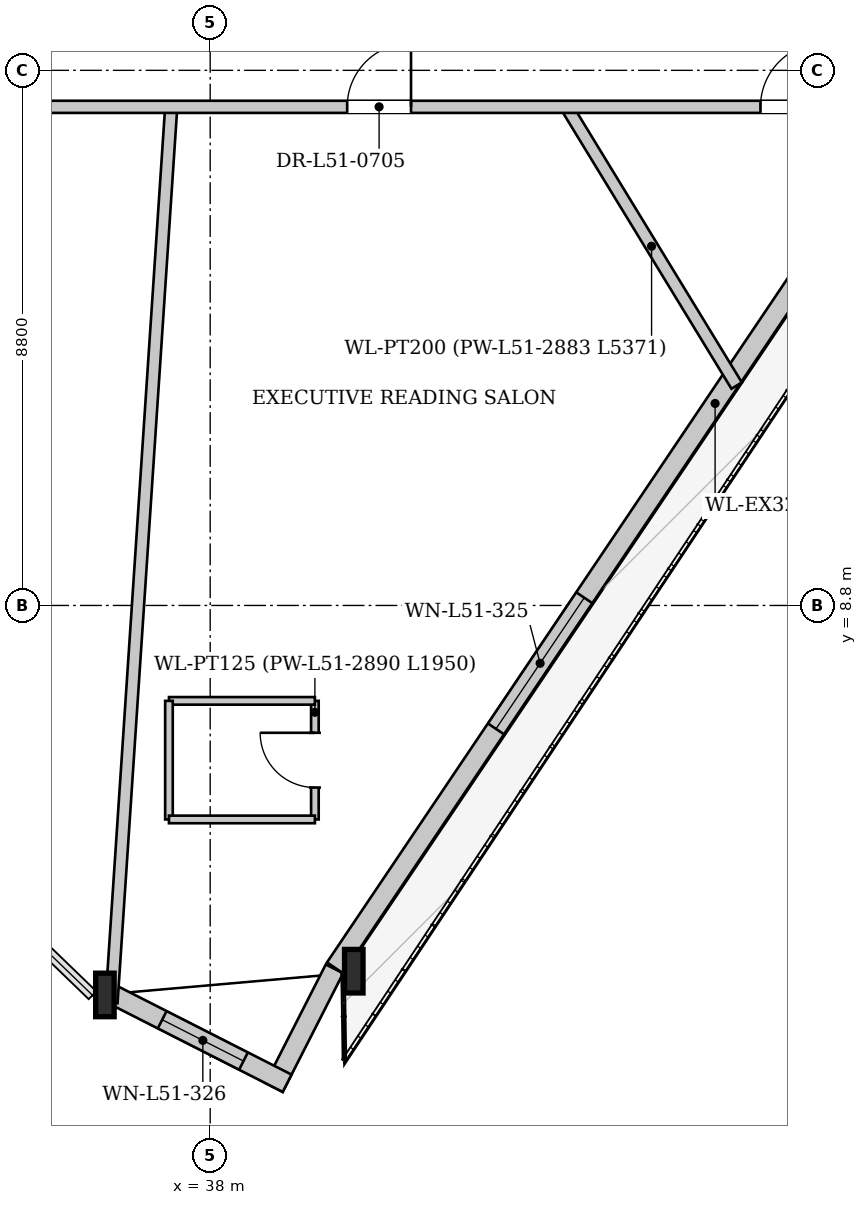
"""IFC4 building model, lengths in metres.
Left out: names, types, materials, properties, quantities, classifications, styles, units other than length and angle.
Written with IfcOpenShell. Run it as: python <this file> out.ifc"""

import sys

from ifc_helpers import new_model, si_unit, direction, frame, frame_2d, origin, origin_2d, place, context, subcontext, project, spatial, rectangle, i_section, extrude, source, transform, mapped, element, fill, save


model = new_model("IFC4")
c1 = context("Model", 3, precision=1e-05, world=origin(), true_north=direction((0.0, 1.0)))
c2 = subcontext(c1, "Body", "Model", "MODEL_VIEW")
j1 = project(units=[si_unit("LENGTHUNIT", "METRE"), si_unit("PLANEANGLEUNIT", "RADIAN")], contexts=[c1])
p1 = place(None, origin())
s1 = spatial("IfcSite", under=j1, at=p1, CompositionType="ELEMENT")
p2 = place(p1, origin())
s2 = spatial("IfcBuilding", under=s1, at=p2, CompositionType="ELEMENT")
p3 = place(p2, frame((0.0, 0.0, 192.75)))
s3 = spatial("IfcBuildingStorey", under=s2, at=p3, CompositionType="ELEMENT", Elevation=192.75)
m1 = source(origin(), c2, "Body", "SweptSolid", [
    extrude(i_section(OverallWidth=0.304, OverallDepth=0.716, WebThickness=0.021, FlangeThickness=0.04, at=origin_2d()), origin(), (0.0, 0.0, 1.0), 3.409),
])
p4 = place(p3, frame((36.064, 2.39, 0.0), z_axis=(0.119582447406, 0.002649431469, 0.992820738495), x_axis=(-0.022150252792, 0.999754653053, 0.0)))
e1 = element("IfcColumn", 1, at=p4, inside=s3, PredefinedType="COLUMN", context=c2, shape_type="MappedRepresentation", body=[
    mapped(m1, transform((0.0, 0.0, 0.0), x_axis=(1.0, 0.0, 0.0), y_axis=(0.0, 1.0, 0.0), z_axis=(0.0, 0.0, 1.0), scale=1.0)),
])
m2 = source(origin(), c2, "Body", "SweptSolid", [
    extrude(i_section(OverallWidth=0.304, OverallDepth=0.716, WebThickness=0.021, FlangeThickness=0.04, at=origin_2d()), origin(), (0.0, 0.0, 1.0), 3.404),
])
p5 = place(p3, frame((40.186, 2.751, 0.0), z_axis=(0.10306941783, 0.020011390101, 0.994472844966), x_axis=(-0.190595380808, 0.981668681794, 0.0)))
e2 = element("IfcColumn", 2, at=p5, inside=s3, PredefinedType="COLUMN", context=c2, shape_type="MappedRepresentation", body=[
    mapped(m2, transform((0.0, 0.0, 0.0), x_axis=(1.0, 0.0, 0.0), y_axis=(0.0, 1.0, 0.0), z_axis=(0.0, 0.0, 1.0), scale=1.0)),
])
p6 = place(p3, frame((53.026, 22.104, 0.0), z_axis=(0.0, 0.0, 1.0), x_axis=(-0.558570859801, -0.829456806941, 0.0)))
e3 = element("IfcWall", 3, at=p6, inside=s3, PredefinedType="SOLIDWALL", context=c2, shape_type="SweptSolid", body=[
    extrude(rectangle(XDim=23.224, YDim=0.32, at=frame_2d((11.612, 0.0))), origin(), (0.0, 0.0, 1.0), 2.722),
])
p7 = place(p6, frame((6.682, 0.0, 0.0)))
e4 = element("IfcOpeningElement", 4, at=p7, cuts=e3, PredefinedType="OPENING", context=c2, shape_type="SweptSolid", body=[
    extrude(rectangle(XDim=1.5, YDim=2.3, at=frame_2d((0.75, 1.15))), frame((0.0, 0.17, 0.0), z_axis=(0.0, -1.0, 0.0), x_axis=(1.0, 0.0, 0.0)), (0.0, 0.0, 1.0), 0.34),
])
p8 = place(p6, frame((15.886, 0.0, 0.252)))
e5 = element("IfcOpeningElement", 5, at=p8, cuts=e3, PredefinedType="OPENING", context=c2, shape_type="SweptSolid", body=[
    extrude(rectangle(XDim=2.6, YDim=2.35, at=frame_2d((1.3, 1.175))), frame((0.0, 0.17, 0.0), z_axis=(0.0, -1.0, 0.0), x_axis=(1.0, 0.0, 0.0)), (0.0, 0.0, 1.0), 0.34),
])
p9 = place(p3, frame((40.044, 2.824, 0.0), z_axis=(0.0, 0.0, 1.0), x_axis=(-0.45371363181, -0.891147541269, 0.0)))
e6 = element("IfcWall", 6, at=p9, inside=s3, PredefinedType="SOLIDWALL", context=c2, shape_type="SweptSolid", body=[
    extrude(rectangle(XDim=2.189, YDim=0.32, at=frame_2d((1.095, 0.0))), origin(), (0.0, 0.0, 1.0), 2.722),
])
p10 = place(p3, frame((39.265, 0.943, 0.0), z_axis=(0.0, 0.0, 1.0), x_axis=(-0.891429905263, 0.453158607998, 0.0)))
e7 = element("IfcWall", 7, at=p10, inside=s3, PredefinedType="SOLIDWALL", context=c2, shape_type="SweptSolid", body=[
    extrude(rectangle(XDim=3.51, YDim=0.32, at=frame_2d((1.755, 0.0))), origin(), (0.0, 0.0, 1.0), 2.722),
])
p11 = place(p10, frame((0.805, 0.0, 0.302)))
e8 = element("IfcOpeningElement", 8, at=p11, cuts=e7, PredefinedType="OPENING", context=c2, shape_type="SweptSolid", body=[
    extrude(rectangle(XDim=1.5, YDim=2.3, at=frame_2d((0.75, 1.15))), frame((0.0, 0.17, 0.0), z_axis=(0.0, -1.0, 0.0), x_axis=(1.0, 0.0, 0.0)), (0.0, 0.0, 1.0), 0.34),
])
p12 = place(p3, frame((43.86, 17.0, 0.0), z_axis=(0.0, 0.0, 1.0), x_axis=(0.521004990477, -0.853553630359, 0.0)))
e9 = element("IfcWall", 9, at=p12, inside=s3, PredefinedType="PARTITIONING", context=c2, shape_type="SweptSolid", body=[
    extrude(rectangle(XDim=5.371, YDim=0.2, at=frame_2d((2.686, 0.0))), origin(), (0.0, 0.0, 1.0), 3.33),
])
p13 = place(p3, frame((37.359, 17.0, 0.0), z_axis=(0.0, 0.0, 1.0), x_axis=(-0.066576069222, -0.997781352305, 0.0)))
e10 = element("IfcWall", 10, at=p13, inside=s3, PredefinedType="PARTITIONING", context=c2, shape_type="SweptSolid", body=[
    extrude(rectangle(XDim=14.767, YDim=0.2, at=frame_2d((7.384, 0.0))), origin(), (0.0, 0.0, 1.0), 3.33),
])
p14 = place(p3, frame((39.722, 5.281, 0.0), z_axis=(0.0, 0.0, 1.0), x_axis=(0.0, 1.0, 0.0)))
e11 = element("IfcWall", 11, at=p14, inside=s3, PredefinedType="PARTITIONING", context=c2, shape_type="SweptSolid", body=[
    extrude(rectangle(XDim=1.95, YDim=0.125, at=frame_2d((0.975, 0.0))), origin(), (0.0, 0.0, 1.0), 3.33),
])
p15 = place(p14, frame((0.525, 0.0, 0.0)))
e12 = element("IfcOpeningElement", 12, at=p15, cuts=e11, PredefinedType="OPENING", context=c2, shape_type="SweptSolid", body=[
    extrude(rectangle(XDim=0.9, YDim=2.1, at=frame_2d((0.45, 1.05))), frame((0.0, 0.073, 0.0), z_axis=(0.0, -1.0, 0.0), x_axis=(1.0, 0.0, 0.0)), (0.0, 0.0, 1.0), 0.145),
])
p16 = place(p3, frame((39.722, 7.231, 0.0), z_axis=(0.0, 0.0, 1.0), x_axis=(-1.0, 0.0, 0.0)))
e13 = element("IfcWall", 13, at=p16, inside=s3, PredefinedType="PARTITIONING", context=c2, shape_type="SweptSolid", body=[
    extrude(rectangle(XDim=2.4, YDim=0.125, at=frame_2d((1.2, 0.0))), origin(), (0.0, 0.0, 1.0), 3.33),
])
p17 = place(p3, frame((37.322, 7.231, 0.0), z_axis=(0.0, 0.0, 1.0), x_axis=(0.0, -1.0, 0.0)))
e14 = element("IfcWall", 14, at=p17, inside=s3, PredefinedType="PARTITIONING", context=c2, shape_type="SweptSolid", body=[
    extrude(rectangle(XDim=1.95, YDim=0.125, at=frame_2d((0.975, 0.0))), origin(), (0.0, 0.0, 1.0), 3.33),
])
p18 = place(p3, frame((37.322, 5.281, 0.0), z_axis=(0.0, 0.0, 1.0), x_axis=(1.0, 0.0, 0.0)))
e15 = element("IfcWall", 15, at=p18, inside=s3, PredefinedType="PARTITIONING", context=c2, shape_type="SweptSolid", body=[
    extrude(rectangle(XDim=2.4, YDim=0.125, at=frame_2d((1.2, 0.0))), origin(), (0.0, 0.0, 1.0), 3.33),
])
p19 = place(p3, frame((27.6, 17.0, 0.0), z_axis=(0.0, 0.0, 1.0), x_axis=(1.0, 0.0, 0.0)))
e16 = element("IfcWall", 16, at=p19, inside=s3, PredefinedType="PARTITIONING", context=c2, shape_type="SweptSolid", body=[
    extrude(rectangle(XDim=20.8, YDim=0.2, at=frame_2d((10.4, 0.0))), origin(), (0.0, 0.0, 1.0), 3.33),
])
p20 = place(p19, frame((19.45, 0.0, 0.0)))
e17 = element("IfcOpeningElement", 17, at=p20, cuts=e16, PredefinedType="OPENING", context=c2, shape_type="SweptSolid", body=[
    extrude(rectangle(XDim=1.05, YDim=2.2, at=frame_2d((0.525, 1.1))), frame((0.0, 0.11, 0.0), z_axis=(0.0, -1.0, 0.0), x_axis=(1.0, 0.0, 0.0)), (0.0, 0.0, 1.0), 0.22),
])
p21 = place(p19, frame((5.239, 0.0, 0.0)))
e18 = element("IfcOpeningElement", 18, at=p21, cuts=e16, PredefinedType="OPENING", context=c2, shape_type="SweptSolid", body=[
    extrude(rectangle(XDim=1.05, YDim=2.2, at=frame_2d((0.525, 1.1))), frame((0.0, 0.11, 0.0), z_axis=(0.0, -1.0, 0.0), x_axis=(1.0, 0.0, 0.0)), (0.0, 0.0, 1.0), 0.22),
])
p22 = place(p19, frame((12.653, 0.0, 0.0)))
e19 = element("IfcOpeningElement", 19, at=p22, cuts=e16, PredefinedType="OPENING", context=c2, shape_type="SweptSolid", body=[
    extrude(rectangle(XDim=1.05, YDim=2.2, at=frame_2d((0.525, 1.1))), frame((0.0, 0.11, 0.0), z_axis=(0.0, -1.0, 0.0), x_axis=(1.0, 0.0, 0.0)), (0.0, 0.0, 1.0), 0.22),
])
m3 = source(origin(), c2, "Body", "SweptSolid", [
    extrude(rectangle(XDim=2.6, YDim=2.35, at=frame_2d((1.3, 1.175))), frame((0.0, 0.03, 0.0), z_axis=(0.0, -1.0, 0.0), x_axis=(1.0, 0.0, 0.0)), (0.0, 0.0, 1.0), 0.06),
])
p23 = place(p8, origin())
e20 = element("IfcWindow", 20, at=p23, inside=s3, PartitioningType="SINGLE_PANEL", PredefinedType="WINDOW", context=c2, shape_type="MappedRepresentation", body=[
    mapped(m3, transform((0.0, 0.0, 0.0), x_axis=(1.0, 0.0, 0.0), y_axis=(0.0, 1.0, 0.0), z_axis=(0.0, 0.0, 1.0), scale=1.0)),
])
fill(e5, e20)
m4 = source(origin(), c2, "Body", "SweptSolid", [
    extrude(rectangle(XDim=1.5, YDim=2.3, at=frame_2d((0.75, 1.15))), frame((0.0, 0.03, 0.0), z_axis=(0.0, -1.0, 0.0), x_axis=(1.0, 0.0, 0.0)), (0.0, 0.0, 1.0), 0.06),
])
p24 = place(p11, origin())
e21 = element("IfcWindow", 21, at=p24, inside=s3, PartitioningType="SINGLE_PANEL", PredefinedType="WINDOW", context=c2, shape_type="MappedRepresentation", body=[
    mapped(m4, transform((0.0, 0.0, 0.0), x_axis=(1.0, 0.0, 0.0), y_axis=(0.0, 1.0, 0.0), z_axis=(0.0, 0.0, 1.0), scale=1.0)),
])
fill(e8, e21)
m5 = source(origin(), c2, "Body", "SweptSolid", [
    extrude(rectangle(XDim=0.9, YDim=2.1, at=frame_2d((0.45, 1.05))), frame((0.0, 0.025, 0.0), z_axis=(0.0, -1.0, 0.0), x_axis=(1.0, 0.0, 0.0)), (0.0, 0.0, 1.0), 0.05),
])
p25 = place(p15, origin())
e22 = element("IfcDoor", 22, at=p25, inside=s3, OperationType="SINGLE_SWING_RIGHT", PredefinedType="DOOR", context=c2, shape_type="MappedRepresentation", body=[
    mapped(m5, transform((0.0, 0.0, 0.0), x_axis=(1.0, 0.0, 0.0), y_axis=(0.0, 1.0, 0.0), z_axis=(0.0, 0.0, 1.0), scale=1.0)),
])
fill(e12, e22)
m6 = source(origin(), c2, "Body", "SweptSolid", [
    extrude(rectangle(XDim=1.05, YDim=2.2, at=frame_2d((0.525, 1.1))), frame((0.0, 0.025, 0.0), z_axis=(0.0, -1.0, 0.0), x_axis=(1.0, 0.0, 0.0)), (0.0, 0.0, 1.0), 0.05),
])
p26 = place(p20, origin())
e23 = element("IfcDoor", 23, at=p26, inside=s3, OperationType="SINGLE_SWING_RIGHT", PredefinedType="DOOR", context=c2, shape_type="MappedRepresentation", body=[
    mapped(m6, transform((0.0, 0.0, 0.0), x_axis=(1.0, 0.0, 0.0), y_axis=(0.0, 1.0, 0.0), z_axis=(0.0, 0.0, 1.0), scale=1.0)),
])
fill(e17, e23)
p27 = place(p22, origin())
e24 = element("IfcDoor", 24, at=p27, inside=s3, OperationType="SINGLE_SWING_RIGHT", PredefinedType="DOOR", context=c2, shape_type="MappedRepresentation", body=[
    mapped(m6, transform((0.0, 0.0, 0.0), x_axis=(1.0, 0.0, 0.0), y_axis=(0.0, 1.0, 0.0), z_axis=(0.0, 0.0, 1.0), scale=1.0)),
])
fill(e19, e24)
save(model, sys.argv[1])
